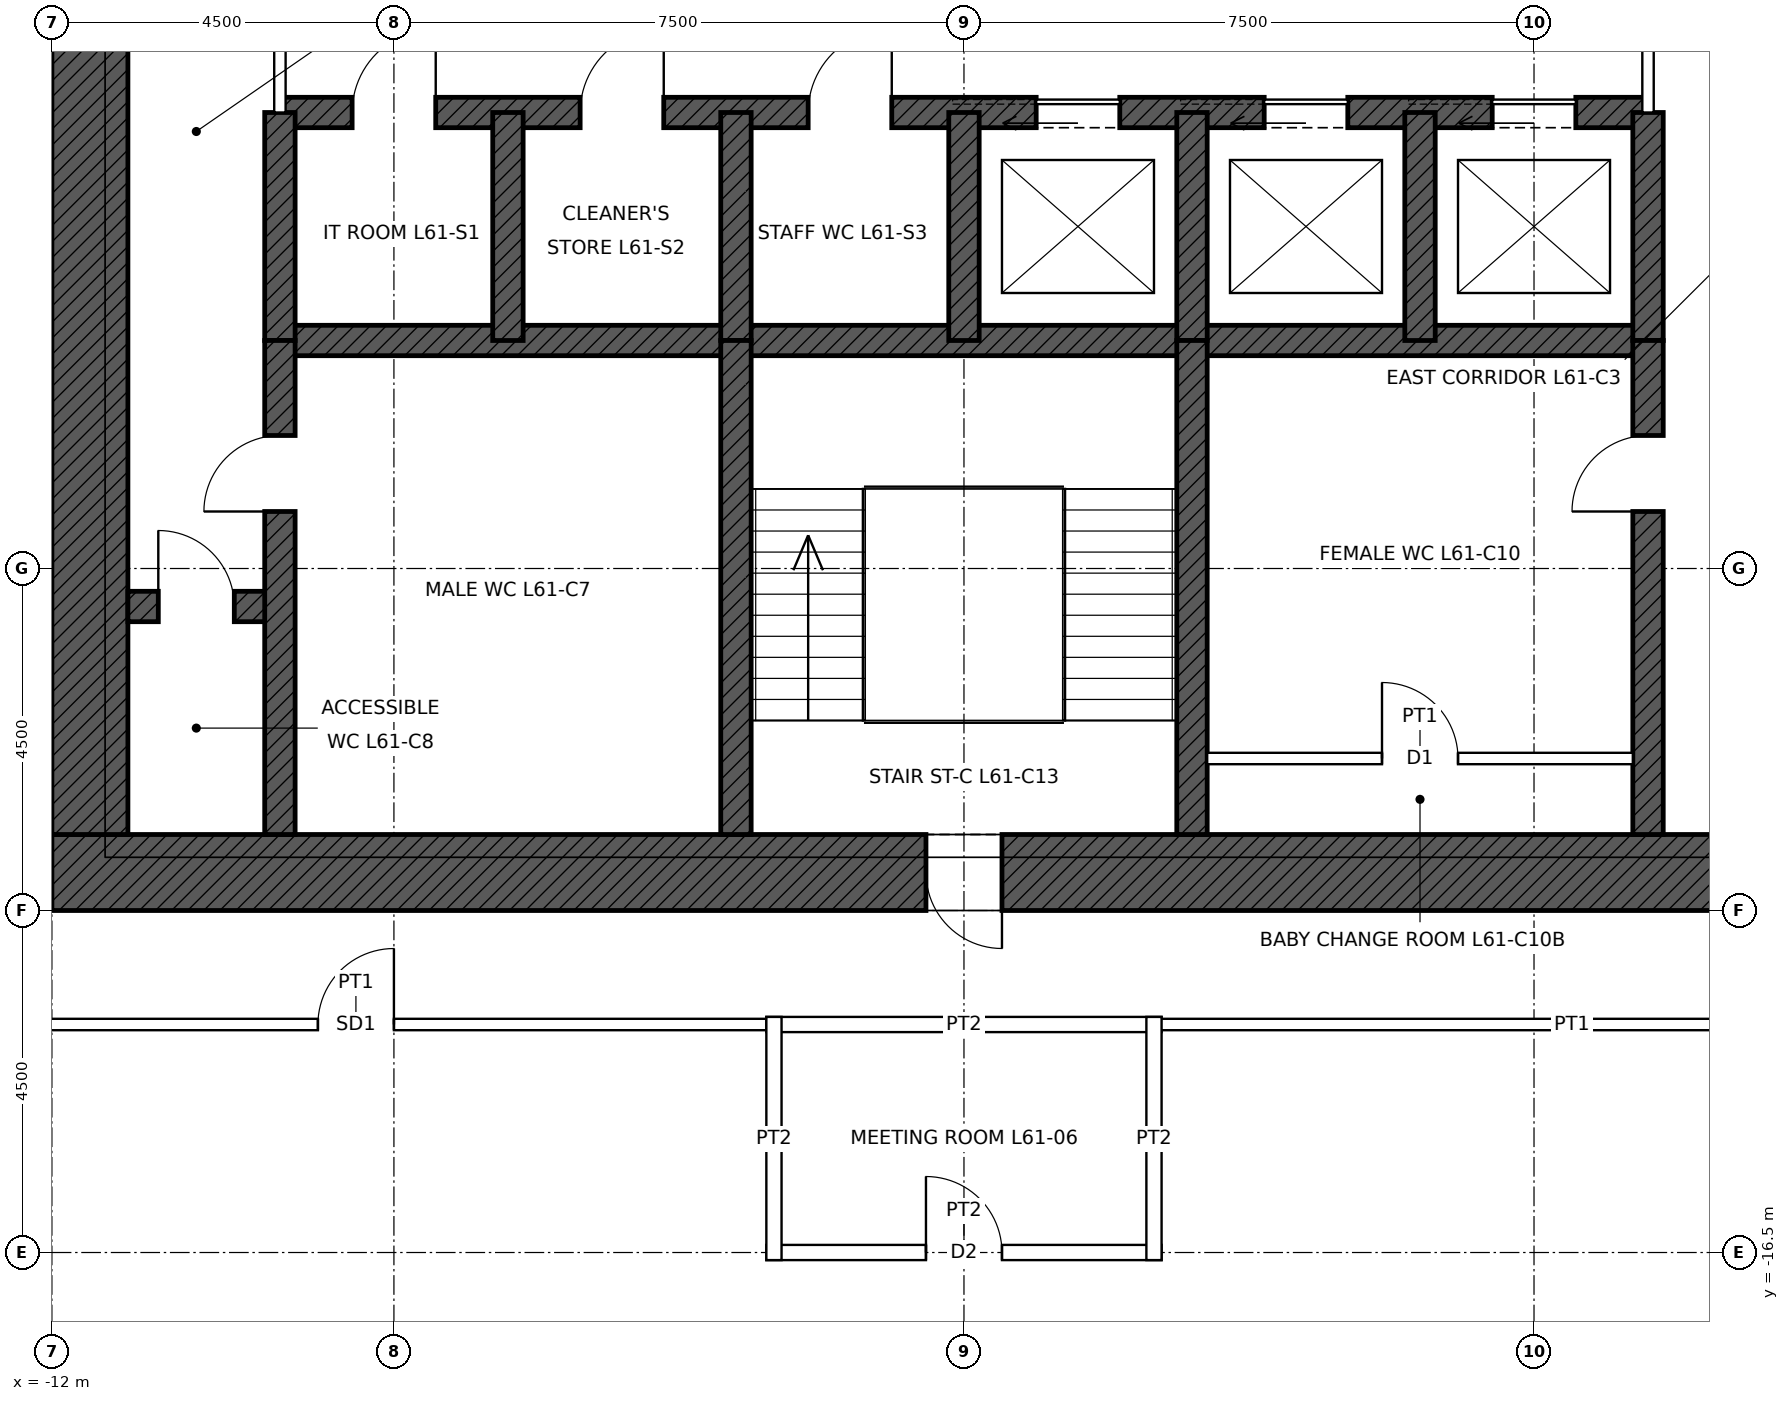
"""IFC4 building model, lengths in metres.
Left out: names, types, materials, properties, quantities, classifications, styles, units other than length and angle.
Written with IfcOpenShell. Run it as: python <this file> out.ifc"""

import sys

from ifc_helpers import new_model, si_unit, direction, frame, frame_2d, origin, place, context, subcontext, project, spatial, rectangle, extrude, element, fill, save


model = new_model("IFC4")
c1 = context("Model", 3, precision=1e-05, world=origin(), true_north=direction((0.0, 1.0)))
c2 = subcontext(c1, "Body", "Model", "MODEL_VIEW")
j1 = project(units=[si_unit("LENGTHUNIT", "METRE"), si_unit("PLANEANGLEUNIT", "RADIAN")], contexts=[c1])
p1 = place(None, origin())
s1 = spatial("IfcSite", under=j1, at=p1, CompositionType="ELEMENT")
p2 = place(p1, origin())
s2 = spatial("IfcBuilding", under=s1, at=p2, CompositionType="ELEMENT")
p3 = place(p2, frame((0.0, 0.0, 279.9)))
s3 = spatial("IfcBuildingStorey", under=s2, at=p3, CompositionType="ELEMENT", Elevation=279.9)
p4 = place(p3, frame((12.0, -11.5, 0.0), z_axis=(0.0, 0.0, 1.0), x_axis=(-1.0, 0.0, 0.0)))
e1 = element("IfcWall", 1, at=p4, inside=s3, PredefinedType="SHEAR", context=c2, shape_type="SweptSolid", body=[
    extrude(rectangle(XDim=24.0, YDim=1.0, at=frame_2d((12.0, 0.0))), origin(), (0.0, 0.0, 1.0), 4.0),
])
p5 = place(p4, frame((11.5, 0.0, 0.0)))
e2 = element("IfcOpeningElement", 2, at=p5, cuts=e1, PredefinedType="OPENING", context=c2, shape_type="SweptSolid", body=[
    extrude(rectangle(XDim=1.0, YDim=2.1, at=frame_2d((0.5, 1.05))), frame((0.0, 0.51, 0.0), z_axis=(0.0, -1.0, 0.0), x_axis=(1.0, 0.0, 0.0)), (0.0, 0.0, 1.0), 1.02),
])
p6 = place(p4, frame((1.0, 0.0, 0.0)))
e3 = element("IfcOpeningElement", 3, at=p6, cuts=e1, PredefinedType="OPENING", context=c2, shape_type="SweptSolid", body=[
    extrude(rectangle(XDim=1.0, YDim=2.4, at=frame_2d((0.5, 1.2))), frame((0.0, 0.51, 0.0), z_axis=(0.0, -1.0, 0.0), x_axis=(1.0, 0.0, 0.0)), (0.0, 0.0, 1.0), 1.02),
])
p7 = place(p3, frame((-11.5, -11.0, 0.0), z_axis=(0.0, 0.0, 1.0), x_axis=(0.0, 1.0, 0.0)))
e4 = element("IfcWall", 4, at=p7, inside=s3, PredefinedType="SHEAR", context=c2, shape_type="SweptSolid", body=[
    extrude(rectangle(XDim=22.0, YDim=1.0, at=frame_2d((11.0, 0.0))), origin(), (0.0, 0.0, 1.0), 4.0),
])
p8 = place(p7, frame((10.5, 0.0, 0.0)))
e5 = element("IfcOpeningElement", 5, at=p8, cuts=e4, PredefinedType="OPENING", context=c2, shape_type="SweptSolid", body=[
    extrude(rectangle(XDim=1.0, YDim=2.4, at=frame_2d((0.5, 1.2))), frame((0.0, 0.51, 0.0), z_axis=(0.0, -1.0, 0.0), x_axis=(1.0, 0.0, 0.0)), (0.0, 0.0, 1.0), 1.02),
])
p9 = place(p3, frame((-9.0, -1.5, 0.0), z_axis=(0.0, 0.0, 1.0), x_axis=(1.0, 0.0, 0.0)))
e6 = element("IfcWall", 6, at=p9, inside=s3, PredefinedType="SHEAR", context=c2, shape_type="SweptSolid", body=[
    extrude(rectangle(XDim=18.0, YDim=0.4, at=frame_2d((9.0, 0.0))), origin(), (0.0, 0.0, 1.0), 4.0),
])
p10 = place(p9, frame((9.95, 0.0, 0.0)))
e7 = element("IfcOpeningElement", 7, at=p10, cuts=e6, PredefinedType="OPENING", context=c2, shape_type="SweptSolid", body=[
    extrude(rectangle(XDim=1.1, YDim=2.1, at=frame_2d((0.55, 1.05))), frame((0.0, 0.21, 0.0), z_axis=(0.0, -1.0, 0.0), x_axis=(1.0, 0.0, 0.0)), (0.0, 0.0, 1.0), 0.42),
])
p11 = place(p9, frame((12.95, 0.0, 0.0)))
e8 = element("IfcOpeningElement", 8, at=p11, cuts=e6, PredefinedType="OPENING", context=c2, shape_type="SweptSolid", body=[
    extrude(rectangle(XDim=1.1, YDim=2.1, at=frame_2d((0.55, 1.05))), frame((0.0, 0.21, 0.0), z_axis=(0.0, -1.0, 0.0), x_axis=(1.0, 0.0, 0.0)), (0.0, 0.0, 1.0), 0.42),
])
p12 = place(p9, frame((15.95, 0.0, 0.0)))
e9 = element("IfcOpeningElement", 9, at=p12, cuts=e6, PredefinedType="OPENING", context=c2, shape_type="SweptSolid", body=[
    extrude(rectangle(XDim=1.1, YDim=2.1, at=frame_2d((0.55, 1.05))), frame((0.0, 0.21, 0.0), z_axis=(0.0, -1.0, 0.0), x_axis=(1.0, 0.0, 0.0)), (0.0, 0.0, 1.0), 0.42),
])
p13 = place(p9, frame((0.95, 0.0, 0.0)))
e10 = element("IfcOpeningElement", 10, at=p13, cuts=e6, PredefinedType="OPENING", context=c2, shape_type="SweptSolid", body=[
    extrude(rectangle(XDim=1.1, YDim=2.1, at=frame_2d((0.55, 1.05))), frame((0.0, 0.21, 0.0), z_axis=(0.0, -1.0, 0.0), x_axis=(1.0, 0.0, 0.0)), (0.0, 0.0, 1.0), 0.42),
])
p14 = place(p9, frame((3.95, 0.0, 0.0)))
e11 = element("IfcOpeningElement", 11, at=p14, cuts=e6, PredefinedType="OPENING", context=c2, shape_type="SweptSolid", body=[
    extrude(rectangle(XDim=1.1, YDim=2.1, at=frame_2d((0.55, 1.05))), frame((0.0, 0.21, 0.0), z_axis=(0.0, -1.0, 0.0), x_axis=(1.0, 0.0, 0.0)), (0.0, 0.0, 1.0), 0.42),
])
p15 = place(p9, frame((6.95, 0.0, 0.0)))
e12 = element("IfcOpeningElement", 12, at=p15, cuts=e6, PredefinedType="OPENING", context=c2, shape_type="SweptSolid", body=[
    extrude(rectangle(XDim=1.1, YDim=2.1, at=frame_2d((0.55, 1.05))), frame((0.0, 0.21, 0.0), z_axis=(0.0, -1.0, 0.0), x_axis=(1.0, 0.0, 0.0)), (0.0, 0.0, 1.0), 0.42),
])
p16 = place(p3, frame((-9.0, -4.5, 0.0), z_axis=(0.0, 0.0, 1.0), x_axis=(1.0, 0.0, 0.0)))
e13 = element("IfcWall", 13, at=p16, inside=s3, PredefinedType="SHEAR", context=c2, shape_type="SweptSolid", body=[
    extrude(rectangle(XDim=18.0, YDim=0.4, at=frame_2d((9.0, 0.0))), origin(), (0.0, 0.0, 1.0), 4.0),
])
p17 = place(p3, frame((-11.0, -8.0, 0.0), z_axis=(0.0, 0.0, 1.0), x_axis=(1.0, 0.0, 0.0)))
e14 = element("IfcWall", 14, at=p17, inside=s3, PredefinedType="SHEAR", context=c2, shape_type="SweptSolid", body=[
    extrude(rectangle(XDim=2.0, YDim=0.4, at=frame_2d((1.0, 0.0))), origin(), (0.0, 0.0, 1.0), 4.0),
])
p18 = place(p17, frame((0.4, 0.0, 0.0)))
e15 = element("IfcOpeningElement", 15, at=p18, cuts=e14, PredefinedType="OPENING", context=c2, shape_type="SweptSolid", body=[
    extrude(rectangle(XDim=1.0, YDim=2.1, at=frame_2d((0.5, 1.05))), frame((0.0, 0.21, 0.0), z_axis=(0.0, -1.0, 0.0), x_axis=(1.0, 0.0, 0.0)), (0.0, 0.0, 1.0), 0.42),
])
for number, where, z_axis, x_axis in (
    (16, (-9.0, -4.5, 0.0), (0.0, 0.0, 1.0), (0.0, 1.0, 0.0)),
    (17, (9.0, -4.5, 0.0), (0.0, 0.0, 1.0), (0.0, 1.0, 0.0)),
    (18, (-6.0, -4.5, 0.0), (0.0, 0.0, 1.0), (0.0, 1.0, 0.0)),
    (19, (-3.0, -4.5, 0.0), (0.0, 0.0, 1.0), (0.0, 1.0, 0.0)),
    (20, (0.0, -4.5, 0.0), (0.0, 0.0, 1.0), (0.0, 1.0, 0.0)),
    (21, (3.0, -4.5, 0.0), (0.0, 0.0, 1.0), (0.0, 1.0, 0.0)),
    (22, (6.0, -4.5, 0.0), (0.0, 0.0, 1.0), (0.0, 1.0, 0.0)),
):
    element("IfcWall", number, at=place(p3, frame(where, z_axis=z_axis, x_axis=x_axis)), inside=s3, PredefinedType="SHEAR", context=c2, shape_type="SweptSolid", body=[
        extrude(rectangle(XDim=3.0, YDim=0.4, at=frame_2d((1.5, 0.0))), origin(), (0.0, 0.0, 1.0), 4.0),
    ])
p19 = place(p3, frame((-9.0, -11.0, 0.0), z_axis=(0.0, 0.0, 1.0), x_axis=(0.0, 1.0, 0.0)))
e23 = element("IfcWall", 23, at=p19, inside=s3, PredefinedType="SHEAR", context=c2, shape_type="SweptSolid", body=[
    extrude(rectangle(XDim=6.5, YDim=0.4, at=frame_2d((3.25, 0.0))), origin(), (0.0, 0.0, 1.0), 4.0),
])
p20 = place(p19, frame((4.25, 0.0, 0.0)))
e24 = element("IfcOpeningElement", 24, at=p20, cuts=e23, PredefinedType="OPENING", context=c2, shape_type="SweptSolid", body=[
    extrude(rectangle(XDim=1.0, YDim=2.1, at=frame_2d((0.5, 1.05))), frame((0.0, 0.21, 0.0), z_axis=(0.0, -1.0, 0.0), x_axis=(1.0, 0.0, 0.0)), (0.0, 0.0, 1.0), 0.42),
])
p21 = place(p3, frame((9.0, -11.0, 0.0), z_axis=(0.0, 0.0, 1.0), x_axis=(0.0, 1.0, 0.0)))
e25 = element("IfcWall", 25, at=p21, inside=s3, PredefinedType="SHEAR", context=c2, shape_type="SweptSolid", body=[
    extrude(rectangle(XDim=6.5, YDim=0.4, at=frame_2d((3.25, 0.0))), origin(), (0.0, 0.0, 1.0), 4.0),
])
p22 = place(p21, frame((4.25, 0.0, 0.0)))
e26 = element("IfcOpeningElement", 26, at=p22, cuts=e25, PredefinedType="OPENING", context=c2, shape_type="SweptSolid", body=[
    extrude(rectangle(XDim=1.0, YDim=2.1, at=frame_2d((0.5, 1.05))), frame((0.0, 0.21, 0.0), z_axis=(0.0, -1.0, 0.0), x_axis=(1.0, 0.0, 0.0)), (0.0, 0.0, 1.0), 0.42),
])
for number, where, z_axis, x_axis in (
    (27, (-3.0, -11.0, 0.0), (0.0, 0.0, 1.0), (0.0, 1.0, 0.0)),
    (28, (3.0, -11.0, 0.0), (0.0, 0.0, 1.0), (0.0, 1.0, 0.0)),
):
    element("IfcWall", number, at=place(p3, frame(where, z_axis=z_axis, x_axis=x_axis)), inside=s3, PredefinedType="SHEAR", context=c2, shape_type="SweptSolid", body=[
        extrude(rectangle(XDim=6.5, YDim=0.4, at=frame_2d((3.25, 0.0))), origin(), (0.0, 0.0, 1.0), 4.0),
    ])
p23 = place(p3, frame((-2.6, -16.5, 0.0), z_axis=(0.0, 0.0, 1.0), x_axis=(1.0, 0.0, 0.0)))
e29 = element("IfcWall", 29, at=p23, inside=s3, PredefinedType="PARTITIONING", context=c2, shape_type="SweptSolid", body=[
    extrude(rectangle(XDim=5.2, YDim=0.2, at=frame_2d((2.6, 0.0))), origin(), (0.0, 0.0, 1.0), 3.85),
])
p24 = place(p23, frame((2.1, 0.0, 0.0)))
e30 = element("IfcOpeningElement", 30, at=p24, cuts=e29, PredefinedType="OPENING", context=c2, shape_type="SweptSolid", body=[
    extrude(rectangle(XDim=1.0, YDim=2.1, at=frame_2d((0.5, 1.05))), frame((0.0, 0.11, 0.0), z_axis=(0.0, -1.0, 0.0), x_axis=(1.0, 0.0, 0.0)), (0.0, 0.0, 1.0), 0.22),
])
p25 = place(p3, frame((-13.575, -13.5, 0.0), z_axis=(0.0, 0.0, 1.0), x_axis=(1.0, 0.0, 0.0)))
e31 = element("IfcWall", 31, at=p25, inside=s3, PredefinedType="PARTITIONING", context=c2, shape_type="SweptSolid", body=[
    extrude(rectangle(XDim=11.15, YDim=0.15, at=frame_2d((5.575, 0.0))), origin(), (0.0, 0.0, 1.0), 3.85),
])
p26 = place(p25, frame((5.075, 0.0, 0.0)))
e32 = element("IfcOpeningElement", 32, at=p26, cuts=e31, PredefinedType="OPENING", context=c2, shape_type="SweptSolid", body=[
    extrude(rectangle(XDim=1.0, YDim=2.4, at=frame_2d((0.5, 1.2))), frame((0.0, 0.085, 0.0), z_axis=(0.0, -1.0, 0.0), x_axis=(1.0, 0.0, 0.0)), (0.0, 0.0, 1.0), 0.17),
])
p27 = place(p3, frame((-2.6, -13.5, 0.0), z_axis=(0.0, 0.0, 1.0), x_axis=(1.0, 0.0, 0.0)))
e33 = element("IfcWall", 33, at=p27, inside=s3, PredefinedType="PARTITIONING", context=c2, shape_type="SweptSolid", body=[
    extrude(rectangle(XDim=5.2, YDim=0.2, at=frame_2d((2.6, 0.0))), origin(), (0.0, 0.0, 1.0), 3.85),
])
p28 = place(p3, frame((2.425, -13.5, 0.0), z_axis=(0.0, 0.0, 1.0), x_axis=(1.0, 0.0, 0.0)))
e34 = element("IfcWall", 34, at=p28, inside=s3, PredefinedType="PARTITIONING", context=c2, shape_type="SweptSolid", body=[
    extrude(rectangle(XDim=11.15, YDim=0.15, at=frame_2d((5.575, 0.0))), origin(), (0.0, 0.0, 1.0), 3.85),
])
for number, where, z_axis, x_axis in (
    (35, (-2.5, -16.6, 0.0), (0.0, 0.0, 1.0), (0.0, 1.0, 0.0)),
    (36, (2.5, -16.6, 0.0), (0.0, 0.0, 1.0), (0.0, 1.0, 0.0)),
):
    element("IfcWall", number, at=place(p3, frame(where, z_axis=z_axis, x_axis=x_axis)), inside=s3, PredefinedType="PARTITIONING", context=c2, shape_type="SweptSolid", body=[
        extrude(rectangle(XDim=3.2, YDim=0.2, at=frame_2d((1.6, 0.0))), origin(), (0.0, 0.0, 1.0), 3.85),
    ])
p29 = place(p3, frame((3.2, -10.0, 0.0), z_axis=(0.0, 0.0, 1.0), x_axis=(1.0, 0.0, 0.0)))
e37 = element("IfcWall", 37, at=p29, inside=s3, PredefinedType="PARTITIONING", context=c2, shape_type="SweptSolid", body=[
    extrude(rectangle(XDim=5.6, YDim=0.15, at=frame_2d((2.8, 0.0))), origin(), (0.0, 0.0, 1.0), 3.75),
])
p30 = place(p29, frame((2.3, 0.0, 0.0)))
e38 = element("IfcOpeningElement", 38, at=p30, cuts=e37, PredefinedType="OPENING", context=c2, shape_type="SweptSolid", body=[
    extrude(rectangle(XDim=1.0, YDim=2.1, at=frame_2d((0.5, 1.05))), frame((0.0, 0.085, 0.0), z_axis=(0.0, -1.0, 0.0), x_axis=(1.0, 0.0, 0.0)), (0.0, 0.0, 1.0), 0.17),
])
p31 = place(p3, frame((-9.0, -1.5, 0.0), z_axis=(0.0, 0.0, 1.0), x_axis=(0.0, 1.0, 0.0)))
e39 = element("IfcWall", 39, at=p31, inside=s3, PredefinedType="PARTITIONING", context=c2, shape_type="SweptSolid", body=[
    extrude(rectangle(XDim=3.0, YDim=0.15, at=frame_2d((1.5, 0.0))), origin(), (0.0, 0.0, 1.0), 3.75),
])
p32 = place(p31, frame((1.0, 0.0, 0.0)))
e40 = element("IfcOpeningElement", 40, at=p32, cuts=e39, PredefinedType="OPENING", context=c2, shape_type="SweptSolid", body=[
    extrude(rectangle(XDim=1.0, YDim=2.4, at=frame_2d((0.5, 1.2))), frame((0.0, 0.085, 0.0), z_axis=(0.0, -1.0, 0.0), x_axis=(1.0, 0.0, 0.0)), (0.0, 0.0, 1.0), 0.17),
])
p33 = place(p3, frame((9.0, -1.5, 0.0), z_axis=(0.0, 0.0, 1.0), x_axis=(0.0, 1.0, 0.0)))
e41 = element("IfcWall", 41, at=p33, inside=s3, PredefinedType="PARTITIONING", context=c2, shape_type="SweptSolid", body=[
    extrude(rectangle(XDim=3.0, YDim=0.15, at=frame_2d((1.5, 0.0))), origin(), (0.0, 0.0, 1.0), 3.75),
])
p34 = place(p33, frame((1.0, 0.0, 0.0)))
e42 = element("IfcOpeningElement", 42, at=p34, cuts=e41, PredefinedType="OPENING", context=c2, shape_type="SweptSolid", body=[
    extrude(rectangle(XDim=1.0, YDim=2.4, at=frame_2d((0.5, 1.2))), frame((0.0, 0.085, 0.0), z_axis=(0.0, -1.0, 0.0), x_axis=(1.0, 0.0, 0.0)), (0.0, 0.0, 1.0), 0.17),
])
p35 = place(p5, origin())
e43 = element("IfcDoor", 43, at=p35, inside=s3, OperationType="SINGLE_SWING_LEFT", PredefinedType="DOOR", context=c2, shape_type="SweptSolid", body=[
    extrude(rectangle(XDim=1.0, YDim=2.1, at=frame_2d((0.5, 1.05))), frame((0.0, 0.485, 0.0), z_axis=(0.0, -1.0, 0.0), x_axis=(1.0, 0.0, 0.0)), (0.0, 0.0, 1.0), 0.05),
])
fill(e2, e43)
p36 = place(p20, origin())
e44 = element("IfcDoor", 44, at=p36, inside=s3, OperationType="SINGLE_SWING_LEFT", PredefinedType="DOOR", context=c2, shape_type="SweptSolid", body=[
    extrude(rectangle(XDim=1.0, YDim=2.1, at=frame_2d((0.5, 1.05))), frame((0.0, 0.025, 0.0), z_axis=(0.0, -1.0, 0.0), x_axis=(1.0, 0.0, 0.0)), (0.0, 0.0, 1.0), 0.05),
])
fill(e24, e44)
p37 = place(p22, origin())
e45 = element("IfcDoor", 45, at=p37, inside=s3, OperationType="SINGLE_SWING_LEFT", PredefinedType="DOOR", context=c2, shape_type="SweptSolid", body=[
    extrude(rectangle(XDim=1.0, YDim=2.1, at=frame_2d((0.5, 1.05))), frame((0.0, 0.025, 0.0), z_axis=(0.0, -1.0, 0.0), x_axis=(1.0, 0.0, 0.0)), (0.0, 0.0, 1.0), 0.05),
])
fill(e26, e45)
p38 = place(p18, origin())
e46 = element("IfcDoor", 46, at=p38, inside=s3, OperationType="SINGLE_SWING_LEFT", PredefinedType="DOOR", context=c2, shape_type="SweptSolid", body=[
    extrude(rectangle(XDim=1.0, YDim=2.1, at=frame_2d((0.5, 1.05))), frame((0.0, 0.025, 0.0), z_axis=(0.0, -1.0, 0.0), x_axis=(1.0, 0.0, 0.0)), (0.0, 0.0, 1.0), 0.05),
])
fill(e15, e46)
p39 = place(p10, origin())
e47 = element("IfcDoor", 47, at=p39, inside=s3, OperationType="SLIDING_TO_LEFT", PredefinedType="DOOR", context=c2, shape_type="SweptSolid", body=[
    extrude(rectangle(XDim=1.1, YDim=2.1, at=frame_2d((0.55, 1.05))), frame((0.0, 0.025, 0.0), z_axis=(0.0, -1.0, 0.0), x_axis=(1.0, 0.0, 0.0)), (0.0, 0.0, 1.0), 0.05),
])
fill(e7, e47)
p40 = place(p11, origin())
e48 = element("IfcDoor", 48, at=p40, inside=s3, OperationType="SLIDING_TO_LEFT", PredefinedType="DOOR", context=c2, shape_type="SweptSolid", body=[
    extrude(rectangle(XDim=1.1, YDim=2.1, at=frame_2d((0.55, 1.05))), frame((0.0, 0.025, 0.0), z_axis=(0.0, -1.0, 0.0), x_axis=(1.0, 0.0, 0.0)), (0.0, 0.0, 1.0), 0.05),
])
fill(e8, e48)
p41 = place(p12, origin())
e49 = element("IfcDoor", 49, at=p41, inside=s3, OperationType="SLIDING_TO_LEFT", PredefinedType="DOOR", context=c2, shape_type="SweptSolid", body=[
    extrude(rectangle(XDim=1.1, YDim=2.1, at=frame_2d((0.55, 1.05))), frame((0.0, 0.025, 0.0), z_axis=(0.0, -1.0, 0.0), x_axis=(1.0, 0.0, 0.0)), (0.0, 0.0, 1.0), 0.05),
])
fill(e9, e49)
p42 = place(p30, origin())
e50 = element("IfcDoor", 50, at=p42, inside=s3, OperationType="SINGLE_SWING_LEFT", PredefinedType="DOOR", context=c2, shape_type="SweptSolid", body=[
    extrude(rectangle(XDim=1.0, YDim=2.1, at=frame_2d((0.5, 1.05))), frame((0.0, 0.025, 0.0), z_axis=(0.0, -1.0, 0.0), x_axis=(1.0, 0.0, 0.0)), (0.0, 0.0, 1.0), 0.05),
])
fill(e38, e50)
p43 = place(p13, origin())
e51 = element("IfcDoor", 51, at=p43, inside=s3, OperationType="SINGLE_SWING_RIGHT", PredefinedType="DOOR", context=c2, shape_type="SweptSolid", body=[
    extrude(rectangle(XDim=1.1, YDim=2.1, at=frame_2d((0.55, 1.05))), frame((0.0, 0.025, 0.0), z_axis=(0.0, -1.0, 0.0), x_axis=(1.0, 0.0, 0.0)), (0.0, 0.0, 1.0), 0.05),
])
fill(e10, e51)
p44 = place(p14, origin())
e52 = element("IfcDoor", 52, at=p44, inside=s3, OperationType="SINGLE_SWING_RIGHT", PredefinedType="DOOR", context=c2, shape_type="SweptSolid", body=[
    extrude(rectangle(XDim=1.1, YDim=2.1, at=frame_2d((0.55, 1.05))), frame((0.0, 0.025, 0.0), z_axis=(0.0, -1.0, 0.0), x_axis=(1.0, 0.0, 0.0)), (0.0, 0.0, 1.0), 0.05),
])
fill(e11, e52)
p45 = place(p15, origin())
e53 = element("IfcDoor", 53, at=p45, inside=s3, OperationType="SINGLE_SWING_RIGHT", PredefinedType="DOOR", context=c2, shape_type="SweptSolid", body=[
    extrude(rectangle(XDim=1.1, YDim=2.1, at=frame_2d((0.55, 1.05))), frame((0.0, 0.025, 0.0), z_axis=(0.0, -1.0, 0.0), x_axis=(1.0, 0.0, 0.0)), (0.0, 0.0, 1.0), 0.05),
])
fill(e12, e53)
p46 = place(p24, origin())
e54 = element("IfcDoor", 54, at=p46, inside=s3, OperationType="SINGLE_SWING_LEFT", PredefinedType="DOOR", context=c2, shape_type="SweptSolid", body=[
    extrude(rectangle(XDim=1.0, YDim=2.1, at=frame_2d((0.5, 1.05))), frame((0.0, 0.025, 0.0), z_axis=(0.0, -1.0, 0.0), x_axis=(1.0, 0.0, 0.0)), (0.0, 0.0, 1.0), 0.05),
])
fill(e30, e54)
p47 = place(p26, origin())
e55 = element("IfcDoor", 55, at=p47, inside=s3, OperationType="SINGLE_SWING_RIGHT", PredefinedType="DOOR", context=c2, shape_type="SweptSolid", body=[
    extrude(rectangle(XDim=1.0, YDim=2.4, at=frame_2d((0.5, 1.2))), frame((0.0, 0.025, 0.0), z_axis=(0.0, -1.0, 0.0), x_axis=(1.0, 0.0, 0.0)), (0.0, 0.0, 1.0), 0.05),
])
fill(e32, e55)
save(model, sys.argv[1])
